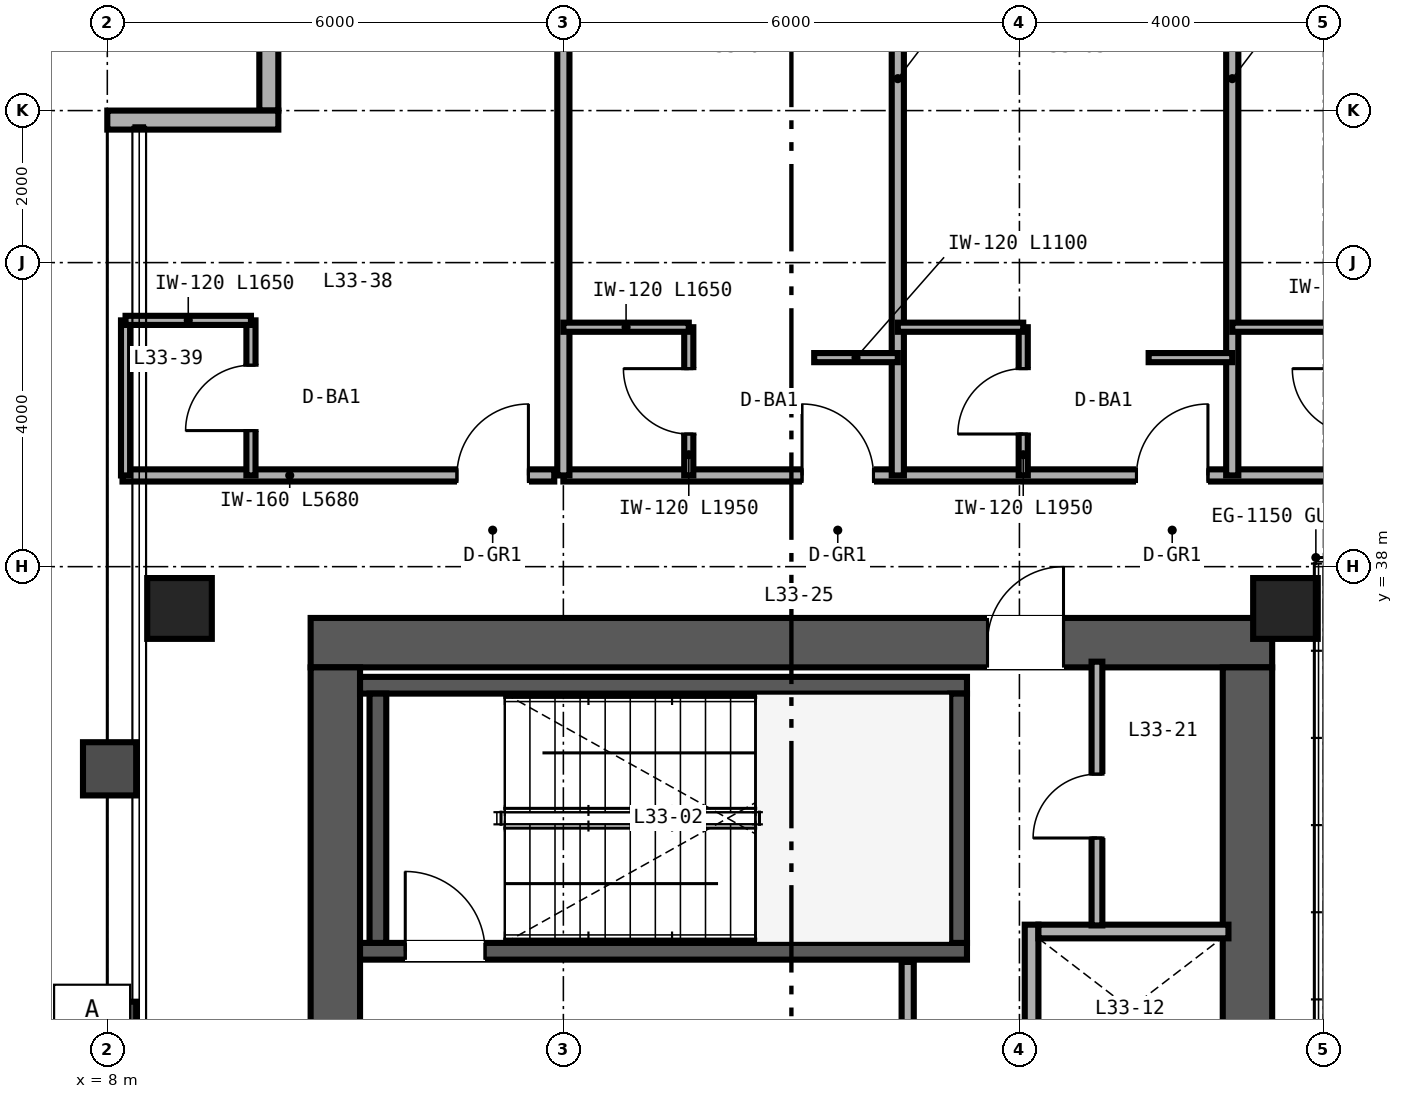
"""IFC4 building model, lengths in metres.
Left out: names, types, materials, properties, quantities, classifications, styles, units other than length and angle.
Written with IfcOpenShell. Run it as: python <this file> out.ifc"""

import sys

from ifc_helpers import new_model, si_unit, direction, frame, frame_2d, origin, origin_2d, place, context, subcontext, project, spatial, rectangle, hollow_rectangle, extrude, source, transform, mapped, element, fill, save


model = new_model("IFC4")
c1 = context("Model", 3, precision=1e-05, world=origin(), true_north=direction((0.0, 1.0)))
c2 = subcontext(c1, "Body", "Model", "MODEL_VIEW")
j1 = project(units=[si_unit("LENGTHUNIT", "METRE"), si_unit("PLANEANGLEUNIT", "RADIAN")], contexts=[c1])
p1 = place(None, origin())
s1 = spatial("IfcSite", under=j1, at=p1, CompositionType="ELEMENT")
p2 = place(p1, origin())
s2 = spatial("IfcBuilding", under=s1, at=p2, CompositionType="ELEMENT")
p3 = place(p2, frame((0.0, 0.0, 133.2)))
s3 = spatial("IfcBuildingStorey", under=s2, at=p3, CompositionType="ELEMENT", Elevation=133.2)
p4 = place(p3, frame((10.675, 37.0, 0.0), z_axis=(0.0, 0.0, 1.0), x_axis=(1.0, 0.0, 0.0)))
e1 = element("IfcWall", 1, at=p4, inside=s3, PredefinedType="SHEAR", context=c2, shape_type="SweptSolid", body=[
    extrude(rectangle(XDim=12.65, YDim=0.65, at=frame_2d((6.325, 0.0))), origin(), (0.0, 0.0, 1.0), 3.36),
])
p5 = place(p4, frame((8.905, 0.0, 0.0)))
e2 = element("IfcOpeningElement", 2, at=p5, cuts=e1, PredefinedType="OPENING", context=c2, shape_type="SweptSolid", body=[
    extrude(rectangle(XDim=1.0, YDim=2.15, at=frame_2d((0.5, 1.075))), frame((0.0, 0.335, 0.0), z_axis=(0.0, -1.0, 0.0), x_axis=(1.0, 0.0, 0.0)), (0.0, 0.0, 1.0), 0.67),
])
for number, where, z_axis, x_axis in (
    (3, (11.0, 15.325, 0.0), (0.0, 0.0, 1.0), (0.0, 1.0, 0.0)),
    (4, (23.0, 15.325, 0.0), (0.0, 0.0, 1.0), (0.0, 1.0, 0.0)),
):
    element("IfcWall", number, at=place(p3, frame(where, z_axis=z_axis, x_axis=x_axis)), inside=s3, PredefinedType="SHEAR", context=c2, shape_type="SweptSolid", body=[
        extrude(rectangle(XDim=21.35, YDim=0.65, at=frame_2d((10.675, 0.0))), origin(), (0.0, 0.0, 1.0), 3.36),
    ])
p6 = place(p3, frame((11.325, 32.94, 0.0), z_axis=(0.0, 0.0, 1.0), x_axis=(1.0, 0.0, 0.0)))
e5 = element("IfcWall", 5, at=p6, inside=s3, PredefinedType="SHEAR", context=c2, shape_type="SweptSolid", body=[
    extrude(rectangle(XDim=7.985, YDim=0.22, at=frame_2d((3.993, 0.0))), origin(), (0.0, 0.0, 1.0), 3.4),
])
p7 = place(p6, frame((0.595, 0.0, 0.0)))
e6 = element("IfcOpeningElement", 6, at=p7, cuts=e5, PredefinedType="OPENING", context=c2, shape_type="SweptSolid", body=[
    extrude(rectangle(XDim=1.05, YDim=2.15, at=frame_2d((0.525, 1.075))), frame((0.0, 0.12, 0.0), z_axis=(0.0, -1.0, 0.0), x_axis=(1.0, 0.0, 0.0)), (0.0, 0.0, 1.0), 0.24),
])
p8 = place(p3, frame((11.325, 36.44, 0.0), z_axis=(0.0, 0.0, 1.0), x_axis=(1.0, 0.0, 0.0)))
e7 = element("IfcWall", 7, at=p8, inside=s3, PredefinedType="SHEAR", context=c2, shape_type="SweptSolid", body=[
    extrude(rectangle(XDim=7.985, YDim=0.22, at=frame_2d((3.993, 0.0))), origin(), (0.0, 0.0, 1.0), 3.4),
])
for number, where, z_axis, x_axis in (
    (8, (11.56, 33.05, 0.0), (0.0, 0.0, 1.0), (0.0, 1.0, 0.0)),
    (9, (19.2, 33.05, 0.0), (0.0, 0.0, 1.0), (0.0, 1.0, 0.0)),
):
    element("IfcWall", number, at=place(p3, frame(where, z_axis=z_axis, x_axis=x_axis)), inside=s3, PredefinedType="SHEAR", context=c2, shape_type="SweptSolid", body=[
        extrude(rectangle(XDim=3.28, YDim=0.22, at=frame_2d((1.64, 0.0))), origin(), (0.0, 0.0, 1.0), 3.4),
    ])
m1 = source(origin(), c2, "Body", "SweptSolid", [
    extrude(hollow_rectangle(XDim=0.85, YDim=0.8, WallThickness=0.032, at=origin_2d()), origin(), (0.0, 0.0, 1.0), 3.36),
])
for number, where, z_axis, x_axis in (
    (10, (8.95, 37.45, 0.0), (0.0, 0.0, 1.0), (1.0, 0.0, 0.0)),
    (11, (23.5, 37.45, 0.0), (0.0, 0.0, 1.0), (1.0, 0.0, 0.0)),
):
    element("IfcColumn", number, at=place(p3, frame(where, z_axis=z_axis, x_axis=x_axis)), inside=s3, PredefinedType="COLUMN", context=c2, shape_type="MappedRepresentation", body=[
        mapped(m1, transform((0.0, 0.0, 0.0), scale=1.0)),
    ])
p9 = place(p3, frame((10.125, 46.0, 0.0), z_axis=(0.0, 0.0, 1.0), x_axis=(0.0, -1.0, 0.0)))
e12 = element("IfcWall", 12, at=p9, inside=s3, PredefinedType="SOLIDWALL", context=c2, shape_type="SweptSolid", body=[
    extrude(rectangle(XDim=2.0, YDim=0.25, at=frame_2d((1.0, 0.0))), origin(), (0.0, 0.0, 1.0), 3.36),
])
p10 = place(p3, frame((10.25, 43.875, 0.0), z_axis=(0.0, 0.0, 1.0), x_axis=(-1.0, 0.0, 0.0)))
e13 = element("IfcWall", 13, at=p10, inside=s3, PredefinedType="SOLIDWALL", context=c2, shape_type="SweptSolid", body=[
    extrude(rectangle(XDim=2.25, YDim=0.25, at=frame_2d((1.125, 0.0))), origin(), (0.0, 0.0, 1.0), 3.36),
])
p11 = place(p3, frame((20.16, 29.0, 0.0), z_axis=(0.0, 0.0, 1.0), x_axis=(0.0, 1.0, 0.0)))
e14 = element("IfcWall", 14, at=p11, inside=s3, PredefinedType="SOLIDWALL", context=c2, shape_type="SweptSolid", body=[
    extrude(rectangle(XDim=4.29, YDim=0.18, at=frame_2d((2.145, 0.0))), origin(), (0.0, 0.0, 1.0), 3.36),
])
p12 = place(p3, frame((20.25, 33.2, 0.0), z_axis=(0.0, 0.0, 1.0), x_axis=(1.0, 0.0, 0.0)))
e15 = element("IfcWall", 15, at=p12, inside=s3, PredefinedType="SOLIDWALL", context=c2, shape_type="SweptSolid", body=[
    extrude(rectangle(XDim=2.5, YDim=0.18, at=frame_2d((1.25, 0.0))), origin(), (0.0, 0.0, 1.0), 3.36),
])
p13 = place(p3, frame((18.53, 28.9, 0.0), z_axis=(0.0, 0.0, 1.0), x_axis=(0.0, 1.0, 0.0)))
e16 = element("IfcWall", 16, at=p13, inside=s3, PredefinedType="PARTITIONING", context=c2, shape_type="SweptSolid", body=[
    extrude(rectangle(XDim=3.9, YDim=0.16, at=frame_2d((1.95, 0.0))), origin(), (0.0, 0.0, 1.0), 3.36),
])
p14 = place(p13, frame((1.5, 0.0, 0.0)))
e17 = element("IfcOpeningElement", 17, at=p14, cuts=e16, PredefinedType="OPENING", context=c2, shape_type="SweptSolid", body=[
    extrude(rectangle(XDim=1.0, YDim=2.15, at=frame_2d((0.5, 1.075))), frame((0.0, 0.09, 0.0), z_axis=(0.0, -1.0, 0.0), x_axis=(1.0, 0.0, 0.0)), (0.0, 0.0, 1.0), 0.18),
])
p15 = place(p3, frame((21.02, 33.28, 0.0), z_axis=(0.0, 0.0, 1.0), x_axis=(0.0, 1.0, 0.0)))
e18 = element("IfcWall", 18, at=p15, inside=s3, PredefinedType="PARTITIONING", context=c2, shape_type="SweptSolid", body=[
    extrude(rectangle(XDim=3.47, YDim=0.142, at=frame_2d((1.735, 0.0))), origin(), (0.0, 0.0, 1.0), 3.36),
])
p16 = place(p15, frame((1.15, 0.0, 0.0)))
e19 = element("IfcOpeningElement", 19, at=p16, cuts=e18, PredefinedType="OPENING", context=c2, shape_type="SweptSolid", body=[
    extrude(rectangle(XDim=0.84, YDim=2.1, at=frame_2d((0.42, 1.05))), frame((0.0, 0.081, 0.0), z_axis=(0.0, -1.0, 0.0), x_axis=(1.0, 0.0, 0.0)), (0.0, 0.0, 1.0), 0.162),
])
p17 = place(p3, frame((8.2, 39.2, 0.0), z_axis=(0.0, 0.0, 1.0), x_axis=(1.0, 0.0, 0.0)))
e20 = element("IfcWall", 20, at=p17, inside=s3, PredefinedType="PARTITIONING", context=c2, shape_type="SweptSolid", body=[
    extrude(rectangle(XDim=5.68, YDim=0.16, at=frame_2d((2.84, 0.0))), origin(), (0.0, 0.0, 1.0), 3.36),
])
p18 = place(p17, frame((4.4, 0.0, 0.0)))
e21 = element("IfcOpeningElement", 21, at=p18, cuts=e20, PredefinedType="OPENING", context=c2, shape_type="SweptSolid", body=[
    extrude(rectangle(XDim=0.94, YDim=2.15, at=frame_2d((0.47, 1.075))), frame((0.0, 0.09, 0.0), z_axis=(0.0, -1.0, 0.0), x_axis=(1.0, 0.0, 0.0)), (0.0, 0.0, 1.0), 0.18),
])
p19 = place(p3, frame((9.89, 39.2, 0.0), z_axis=(0.0, 0.0, 1.0), x_axis=(0.0, 1.0, 0.0)))
e22 = element("IfcWall", 22, at=p19, inside=s3, PredefinedType="PARTITIONING", context=c2, shape_type="SweptSolid", body=[
    extrude(rectangle(XDim=2.04, YDim=0.12, at=frame_2d((1.02, 0.0))), origin(), (0.0, 0.0, 1.0), 3.36),
])
p20 = place(p19, frame((0.59, 0.0, 0.0)))
e23 = element("IfcOpeningElement", 23, at=p20, cuts=e22, PredefinedType="OPENING", context=c2, shape_type="SweptSolid", body=[
    extrude(rectangle(XDim=0.86, YDim=2.1, at=frame_2d((0.43, 1.05))), frame((0.0, 0.07, 0.0), z_axis=(0.0, -1.0, 0.0), x_axis=(1.0, 0.0, 0.0)), (0.0, 0.0, 1.0), 0.14),
])
p21 = place(p3, frame((8.24, 39.2, 0.0), z_axis=(0.0, 0.0, 1.0), x_axis=(0.0, 1.0, 0.0)))
e24 = element("IfcWall", 24, at=p21, inside=s3, PredefinedType="PARTITIONING", context=c2, shape_type="SweptSolid", body=[
    extrude(rectangle(XDim=2.04, YDim=0.12, at=frame_2d((1.02, 0.0))), origin(), (0.0, 0.0, 1.0), 3.36),
])
p22 = place(p3, frame((8.24, 41.24, 0.0), z_axis=(0.0, 0.0, 1.0), x_axis=(1.0, 0.0, 0.0)))
e25 = element("IfcWall", 25, at=p22, inside=s3, PredefinedType="PARTITIONING", context=c2, shape_type="SweptSolid", body=[
    extrude(rectangle(XDim=1.65, YDim=0.12, at=frame_2d((0.825, 0.0))), origin(), (0.0, 0.0, 1.0), 3.36),
])
p23 = place(p3, frame((14.0, 39.2, 0.0), z_axis=(0.0, 0.0, 1.0), x_axis=(1.0, 0.0, 0.0)))
e26 = element("IfcWall", 26, at=p23, inside=s3, PredefinedType="PARTITIONING", context=c2, shape_type="SweptSolid", body=[
    extrude(rectangle(XDim=36.0, YDim=0.16, at=frame_2d((18.0, 0.0))), origin(), (0.0, 0.0, 1.0), 2.581),
])
p24 = place(p23, frame((3.14, 0.0, 0.0)))
e27 = element("IfcOpeningElement", 27, at=p24, cuts=e26, PredefinedType="OPENING", context=c2, shape_type="SweptSolid", body=[
    extrude(rectangle(XDim=0.94, YDim=2.15, at=frame_2d((0.47, 1.075))), frame((0.0, 0.09, 0.0), z_axis=(0.0, -1.0, 0.0), x_axis=(1.0, 0.0, 0.0)), (0.0, 0.0, 1.0), 0.18),
])
p25 = place(p23, frame((7.54, 0.0, 0.0)))
e28 = element("IfcOpeningElement", 28, at=p25, cuts=e26, PredefinedType="OPENING", context=c2, shape_type="SweptSolid", body=[
    extrude(rectangle(XDim=0.94, YDim=2.15, at=frame_2d((0.47, 1.075))), frame((0.0, 0.09, 0.0), z_axis=(0.0, -1.0, 0.0), x_axis=(1.0, 0.0, 0.0)), (0.0, 0.0, 1.0), 0.18),
])
p26 = place(p23, frame((11.94, 0.0, 0.0)))
e29 = element("IfcOpeningElement", 29, at=p26, cuts=e26, PredefinedType="OPENING", context=c2, shape_type="SweptSolid", body=[
    extrude(rectangle(XDim=0.94, YDim=2.15, at=frame_2d((0.47, 1.075))), frame((0.0, 0.09, 0.0), z_axis=(0.0, -1.0, 0.0), x_axis=(1.0, 0.0, 0.0)), (0.0, 0.0, 1.0), 0.18),
])
p27 = place(p23, frame((15.02, 0.0, 0.0)))
e30 = element("IfcOpeningElement", 30, at=p27, cuts=e26, PredefinedType="OPENING", context=c2, shape_type="SweptSolid", body=[
    extrude(rectangle(XDim=0.96, YDim=2.15, at=frame_2d((0.48, 1.075))), frame((0.0, 0.09, 0.0), z_axis=(0.0, -1.0, 0.0), x_axis=(1.0, 0.0, 0.0)), (0.0, 0.0, 1.0), 0.18),
])
p28 = place(p23, frame((21.14, 0.0, 0.0)))
e31 = element("IfcOpeningElement", 31, at=p28, cuts=e26, PredefinedType="OPENING", context=c2, shape_type="SweptSolid", body=[
    extrude(rectangle(XDim=0.94, YDim=2.15, at=frame_2d((0.47, 1.075))), frame((0.0, 0.09, 0.0), z_axis=(0.0, -1.0, 0.0), x_axis=(1.0, 0.0, 0.0)), (0.0, 0.0, 1.0), 0.18),
])
p29 = place(p23, frame((24.79, 0.0, 0.0)))
e32 = element("IfcOpeningElement", 32, at=p29, cuts=e26, PredefinedType="OPENING", context=c2, shape_type="SweptSolid", body=[
    extrude(rectangle(XDim=0.94, YDim=2.15, at=frame_2d((0.47, 1.075))), frame((0.0, 0.09, 0.0), z_axis=(0.0, -1.0, 0.0), x_axis=(1.0, 0.0, 0.0)), (0.0, 0.0, 1.0), 0.18),
])
p30 = place(p23, frame((30.24, 0.0, 0.0)))
e33 = element("IfcOpeningElement", 33, at=p30, cuts=e26, PredefinedType="OPENING", context=c2, shape_type="SweptSolid", body=[
    extrude(rectangle(XDim=0.94, YDim=2.15, at=frame_2d((0.47, 1.075))), frame((0.0, 0.09, 0.0), z_axis=(0.0, -1.0, 0.0), x_axis=(1.0, 0.0, 0.0)), (0.0, 0.0, 1.0), 0.18),
])
p31 = place(p23, frame((34.74, 0.0, 0.0)))
e34 = element("IfcOpeningElement", 34, at=p31, cuts=e26, PredefinedType="OPENING", context=c2, shape_type="SweptSolid", body=[
    extrude(rectangle(XDim=0.94, YDim=2.15, at=frame_2d((0.47, 1.075))), frame((0.0, 0.09, 0.0), z_axis=(0.0, -1.0, 0.0), x_axis=(1.0, 0.0, 0.0)), (0.0, 0.0, 1.0), 0.18),
])
for number, where, z_axis, x_axis in (
    (35, (14.0, 39.2, 0.0), (0.0, 0.0, 1.0), (0.0, 1.0, 0.0)),
    (36, (18.4, 39.2, 0.0), (0.0, 0.0, 1.0), (0.0, 1.0, 0.0)),
):
    element("IfcWall", number, at=place(p3, frame(where, z_axis=z_axis, x_axis=x_axis)), inside=s3, PredefinedType="PARTITIONING", context=c2, shape_type="SweptSolid", body=[
        extrude(rectangle(XDim=10.44, YDim=0.16, at=frame_2d((5.22, 0.0))), origin(), (0.0, 0.0, 1.0), 2.667),
    ])
p32 = place(p3, frame((15.65, 39.2, 0.0), z_axis=(0.0, 0.0, 1.0), x_axis=(0.0, 1.0, 0.0)))
e37 = element("IfcWall", 37, at=p32, inside=s3, PredefinedType="PARTITIONING", context=c2, shape_type="SweptSolid", body=[
    extrude(rectangle(XDim=1.95, YDim=0.12, at=frame_2d((0.975, 0.0))), origin(), (0.0, 0.0, 1.0), 3.36),
])
p33 = place(p32, frame((0.545, 0.0, 0.0)))
e38 = element("IfcOpeningElement", 38, at=p33, cuts=e37, PredefinedType="OPENING", context=c2, shape_type="SweptSolid", body=[
    extrude(rectangle(XDim=0.86, YDim=2.1, at=frame_2d((0.43, 1.05))), frame((0.0, 0.07, 0.0), z_axis=(0.0, -1.0, 0.0), x_axis=(1.0, 0.0, 0.0)), (0.0, 0.0, 1.0), 0.14),
])
p34 = place(p3, frame((14.0, 41.15, 0.0), z_axis=(0.0, 0.0, 1.0), x_axis=(1.0, 0.0, 0.0)))
e39 = element("IfcWall", 39, at=p34, inside=s3, PredefinedType="PARTITIONING", context=c2, shape_type="SweptSolid", body=[
    extrude(rectangle(XDim=1.65, YDim=0.12, at=frame_2d((0.825, 0.0))), origin(), (0.0, 0.0, 1.0), 3.36),
])
p35 = place(p3, frame((17.3, 40.75, 0.0), z_axis=(0.0, 0.0, 1.0), x_axis=(1.0, 0.0, 0.0)))
e40 = element("IfcWall", 40, at=p35, inside=s3, PredefinedType="PARTITIONING", context=c2, shape_type="SweptSolid", body=[
    extrude(rectangle(XDim=1.1, YDim=0.12, at=frame_2d((0.55, 0.0))), origin(), (0.0, 0.0, 1.0), 3.36),
])
p36 = place(p3, frame((22.8, 39.2, 0.0), z_axis=(0.0, 0.0, 1.0), x_axis=(0.0, 1.0, 0.0)))
e41 = element("IfcWall", 41, at=p36, inside=s3, PredefinedType="PARTITIONING", context=c2, shape_type="SweptSolid", body=[
    extrude(rectangle(XDim=10.44, YDim=0.16, at=frame_2d((5.22, 0.0))), origin(), (0.0, 0.0, 1.0), 2.823),
])
p37 = place(p3, frame((20.05, 39.2, 0.0), z_axis=(0.0, 0.0, 1.0), x_axis=(0.0, 1.0, 0.0)))
e42 = element("IfcWall", 42, at=p37, inside=s3, PredefinedType="PARTITIONING", context=c2, shape_type="SweptSolid", body=[
    extrude(rectangle(XDim=1.95, YDim=0.12, at=frame_2d((0.975, 0.0))), origin(), (0.0, 0.0, 1.0), 3.36),
])
p38 = place(p37, frame((0.545, 0.0, 0.0)))
e43 = element("IfcOpeningElement", 43, at=p38, cuts=e42, PredefinedType="OPENING", context=c2, shape_type="SweptSolid", body=[
    extrude(rectangle(XDim=0.86, YDim=2.1, at=frame_2d((0.43, 1.05))), frame((0.0, 0.07, 0.0), z_axis=(0.0, -1.0, 0.0), x_axis=(1.0, 0.0, 0.0)), (0.0, 0.0, 1.0), 0.14),
])
p39 = place(p3, frame((18.4, 41.15, 0.0), z_axis=(0.0, 0.0, 1.0), x_axis=(1.0, 0.0, 0.0)))
e44 = element("IfcWall", 44, at=p39, inside=s3, PredefinedType="PARTITIONING", context=c2, shape_type="SweptSolid", body=[
    extrude(rectangle(XDim=1.65, YDim=0.12, at=frame_2d((0.825, 0.0))), origin(), (0.0, 0.0, 1.0), 3.36),
])
p40 = place(p3, frame((21.7, 40.75, 0.0), z_axis=(0.0, 0.0, 1.0), x_axis=(1.0, 0.0, 0.0)))
e45 = element("IfcWall", 45, at=p40, inside=s3, PredefinedType="PARTITIONING", context=c2, shape_type="SweptSolid", body=[
    extrude(rectangle(XDim=1.1, YDim=0.12, at=frame_2d((0.55, 0.0))), origin(), (0.0, 0.0, 1.0), 3.36),
])
p41 = place(p3, frame((22.8, 41.15, 0.0), z_axis=(0.0, 0.0, 1.0), x_axis=(1.0, 0.0, 0.0)))
e46 = element("IfcWall", 46, at=p41, inside=s3, PredefinedType="PARTITIONING", context=c2, shape_type="SweptSolid", body=[
    extrude(rectangle(XDim=1.65, YDim=0.12, at=frame_2d((0.825, 0.0))), origin(), (0.0, 0.0, 1.0), 2.581),
])
m2 = source(origin(), c2, "Body", "SweptSolid", [
    extrude(rectangle(XDim=1.05, YDim=2.15, at=frame_2d((0.525, 1.075))), frame((0.0, 0.025, 0.0), z_axis=(0.0, -1.0, 0.0), x_axis=(1.0, 0.0, 0.0)), (0.0, 0.0, 1.0), 0.05),
])
p42 = place(p7, origin())
e47 = element("IfcDoor", 47, at=p42, inside=s3, OperationType="SINGLE_SWING_LEFT", PredefinedType="DOOR", context=c2, shape_type="MappedRepresentation", body=[
    mapped(m2, transform((0.0, 0.0, 0.0), scale=1.0)),
])
fill(e6, e47)
m3 = source(origin(), c2, "Body", "SweptSolid", [
    extrude(rectangle(XDim=0.84, YDim=2.1, at=frame_2d((0.42, 1.05))), frame((0.0, 0.025, 0.0), z_axis=(0.0, -1.0, 0.0), x_axis=(1.0, 0.0, 0.0)), (0.0, 0.0, 1.0), 0.05),
])
p43 = place(p16, origin())
e48 = element("IfcDoor", 48, at=p43, inside=s3, OperationType="SINGLE_SWING_LEFT", PredefinedType="DOOR", context=c2, shape_type="MappedRepresentation", body=[
    mapped(m3, transform((0.0, 0.0, 0.0), scale=1.0)),
])
fill(e19, e48)
m4 = source(origin(), c2, "Body", "SweptSolid", [
    extrude(rectangle(XDim=1.0, YDim=2.15, at=frame_2d((0.5, 1.075))), frame((0.0, 0.025, 0.0), z_axis=(0.0, -1.0, 0.0), x_axis=(1.0, 0.0, 0.0)), (0.0, 0.0, 1.0), 0.05),
])
p44 = place(p5, origin())
e49 = element("IfcDoor", 49, at=p44, inside=s3, OperationType="SINGLE_SWING_RIGHT", PredefinedType="DOOR", context=c2, shape_type="MappedRepresentation", body=[
    mapped(m4, transform((0.0, 0.0, 0.0), scale=1.0)),
])
fill(e2, e49)
m5 = source(origin(), c2, "Body", "SweptSolid", [
    extrude(rectangle(XDim=0.86, YDim=2.1, at=frame_2d((0.43, 1.05))), frame((0.0, 0.025, 0.0), z_axis=(0.0, -1.0, 0.0), x_axis=(1.0, 0.0, 0.0)), (0.0, 0.0, 1.0), 0.05),
])
p45 = place(p20, origin())
e50 = element("IfcDoor", 50, at=p45, inside=s3, OperationType="SINGLE_SWING_LEFT", PredefinedType="DOOR", context=c2, shape_type="MappedRepresentation", body=[
    mapped(m5, transform((0.0, 0.0, 0.0), scale=1.0)),
])
fill(e23, e50)
m6 = source(origin(), c2, "Body", "SweptSolid", [
    extrude(rectangle(XDim=0.94, YDim=2.15, at=frame_2d((0.47, 1.075))), frame((0.0, 0.025, 0.0), z_axis=(0.0, -1.0, 0.0), x_axis=(1.0, 0.0, 0.0)), (0.0, 0.0, 1.0), 0.05),
])
p46 = place(p18, origin())
e51 = element("IfcDoor", 51, at=p46, inside=s3, OperationType="SINGLE_SWING_RIGHT", PredefinedType="DOOR", context=c2, shape_type="MappedRepresentation", body=[
    mapped(m6, transform((0.0, 0.0, 0.0), scale=1.0)),
])
fill(e21, e51)
p47 = place(p33, origin())
e52 = element("IfcDoor", 52, at=p47, inside=s3, OperationType="SINGLE_SWING_RIGHT", PredefinedType="DOOR", context=c2, shape_type="MappedRepresentation", body=[
    mapped(m5, transform((0.0, 0.0, 0.0), scale=1.0)),
])
fill(e38, e52)
p48 = place(p38, origin())
e53 = element("IfcDoor", 53, at=p48, inside=s3, OperationType="SINGLE_SWING_LEFT", PredefinedType="DOOR", context=c2, shape_type="MappedRepresentation", body=[
    mapped(m5, transform((0.0, 0.0, 0.0), scale=1.0)),
])
fill(e43, e53)
p49 = place(p24, origin())
e54 = element("IfcDoor", 54, at=p49, inside=s3, OperationType="SINGLE_SWING_LEFT", PredefinedType="DOOR", context=c2, shape_type="MappedRepresentation", body=[
    mapped(m6, transform((0.0, 0.0, 0.0), scale=1.0)),
])
fill(e27, e54)
p50 = place(p25, origin())
e55 = element("IfcDoor", 55, at=p50, inside=s3, OperationType="SINGLE_SWING_RIGHT", PredefinedType="DOOR", context=c2, shape_type="MappedRepresentation", body=[
    mapped(m6, transform((0.0, 0.0, 0.0), scale=1.0)),
])
fill(e28, e55)
save(model, sys.argv[1])
